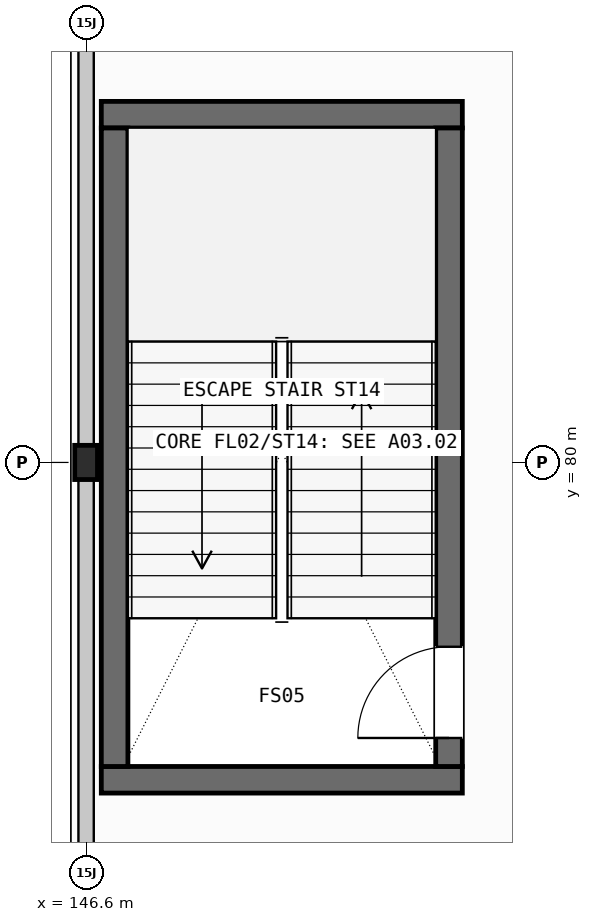
"""IFC4 building model, lengths in metres.
Left out: names, types, materials, properties, quantities, classifications, styles, units other than length and angle.
Written with IfcOpenShell. Run it as: python <this file> out.ifc"""

import sys

from ifc_helpers import new_model, si_unit, direction, frame, frame_2d, origin, origin_2d, place, context, subcontext, project, spatial, rectangle, i_section, extrude, element, fill, save


model = new_model("IFC4")
c1 = context("Model", 3, precision=1e-05, world=origin(), true_north=direction((0.0, 1.0)))
c2 = subcontext(c1, "Body", "Model", "MODEL_VIEW")
j1 = project(units=[si_unit("LENGTHUNIT", "METRE"), si_unit("PLANEANGLEUNIT", "RADIAN")], contexts=[c1])
p1 = place(None, origin())
s1 = spatial("IfcSite", under=j1, at=p1, CompositionType="ELEMENT")
p2 = place(p1, origin())
s2 = spatial("IfcBuilding", under=s1, at=p2, CompositionType="ELEMENT")
p3 = place(p2, frame((0.0, 0.0, 11.4)))
s3 = spatial("IfcBuildingStorey", under=s2, at=p3, CompositionType="ELEMENT", Elevation=11.4)
p4 = place(p3, frame((146.0, 80.0, 0.0), z_axis=(0.0, 0.0, 1.0), x_axis=(1.0, 0.0, 0.0)))
e1 = element("IfcColumn", 1, at=p4, inside=s3, PredefinedType="COLUMN", context=c2, shape_type="SweptSolid", body=[
    extrude(i_section(OverallWidth=0.3, OverallDepth=0.9, WebThickness=0.019, FlangeThickness=0.035, FilletRadius=0.03, at=origin_2d()), origin(), (0.0, 0.0, 1.0), 7.0),
])
p5 = place(p2, frame((0.0, 0.0, 16.8)))
s4 = spatial("IfcBuildingStorey", under=s2, at=p5, CompositionType="ELEMENT", Elevation=16.8)
p6 = place(p5, frame((146.6, 80.0, 0.0), z_axis=(0.0, 0.0, 1.0), x_axis=(1.0, 0.0, 0.0)))
e2 = element("IfcColumn", 2, at=p6, inside=s4, PredefinedType="COLUMN", context=c2, shape_type="SweptSolid", body=[
    extrude(i_section(OverallWidth=0.3, OverallDepth=0.45, WebThickness=0.014, FlangeThickness=0.026, FilletRadius=0.027, at=origin_2d()), origin(), (0.0, 0.0, 1.0), 4.8),
])
for number, where, z_axis, x_axis in (
    (3, (146.8, 75.825, 0.0), (0.0, 0.0, 1.0), (1.0, 0.0, 0.0)),
    (4, (146.8, 84.575, 0.0), (0.0, 0.0, 1.0), (1.0, 0.0, 0.0)),
):
    element("IfcWall", number, at=place(p5, frame(where, z_axis=z_axis, x_axis=x_axis)), inside=s4, PredefinedType="SHEAR", context=c2, shape_type="SweptSolid", body=[
        extrude(rectangle(XDim=4.75, YDim=0.35, at=frame_2d((2.375, 0.0))), origin(), (0.0, 0.0, 1.0), 4.8),
    ])
p7 = place(p5, frame((146.975, 76.0, 0.0), z_axis=(0.0, 0.0, 1.0), x_axis=(0.0, 1.0, 0.0)))
e5 = element("IfcWall", 5, at=p7, inside=s4, PredefinedType="SHEAR", context=c2, shape_type="SweptSolid", body=[
    extrude(rectangle(XDim=8.4, YDim=0.35, at=frame_2d((4.2, 0.0))), origin(), (0.0, 0.0, 1.0), 4.8),
])
p8 = place(p5, frame((151.375, 76.0, 0.0), z_axis=(0.0, 0.0, 1.0), x_axis=(0.0, 1.0, 0.0)))
e6 = element("IfcWall", 6, at=p8, inside=s4, PredefinedType="SHEAR", context=c2, shape_type="SweptSolid", body=[
    extrude(rectangle(XDim=8.4, YDim=0.35, at=frame_2d((4.2, 0.0))), origin(), (0.0, 0.0, 1.0), 4.8),
])
p9 = place(p8, frame((0.375, 0.0, 0.0)))
e7 = element("IfcOpeningElement", 7, at=p9, cuts=e6, PredefinedType="OPENING", context=c2, shape_type="SweptSolid", body=[
    extrude(rectangle(XDim=1.2, YDim=2.2, at=frame_2d((0.6, 1.1))), frame((0.0, 0.185, 0.0), z_axis=(0.0, -1.0, 0.0), x_axis=(1.0, 0.0, 0.0)), (0.0, 0.0, 1.0), 0.37),
])
for number, where, z_axis, x_axis in (
    (8, (146.6, 74.221, 0.0), (0.0, 0.0, 1.0), (0.0, 1.0, 0.0)),
    (9, (146.6, 80.221, 0.0), (0.0, 0.0, 1.0), (0.0, 1.0, 0.0)),
):
    element("IfcWall", number, at=place(p5, frame(where, z_axis=z_axis, x_axis=x_axis)), inside=s4, PredefinedType="STANDARD", context=c2, shape_type="SweptSolid", body=[
        extrude(rectangle(XDim=5.558, YDim=0.202, at=frame_2d((2.779, 0.0))), origin(), (0.0, 0.0, 1.0), 3.965),
    ])
p10 = place(p9, origin())
e10 = element("IfcDoor", 10, at=p10, inside=s4, OperationType="SINGLE_SWING_LEFT", PredefinedType="DOOR", context=c2, shape_type="SweptSolid", body=[
    extrude(rectangle(XDim=1.2, YDim=2.2, at=frame_2d((0.6, 1.1))), frame((0.0, 0.025, 0.0), z_axis=(0.0, -1.0, 0.0), x_axis=(1.0, 0.0, 0.0)), (0.0, 0.0, 1.0), 0.05),
])
fill(e7, e10)
save(model, sys.argv[1])
